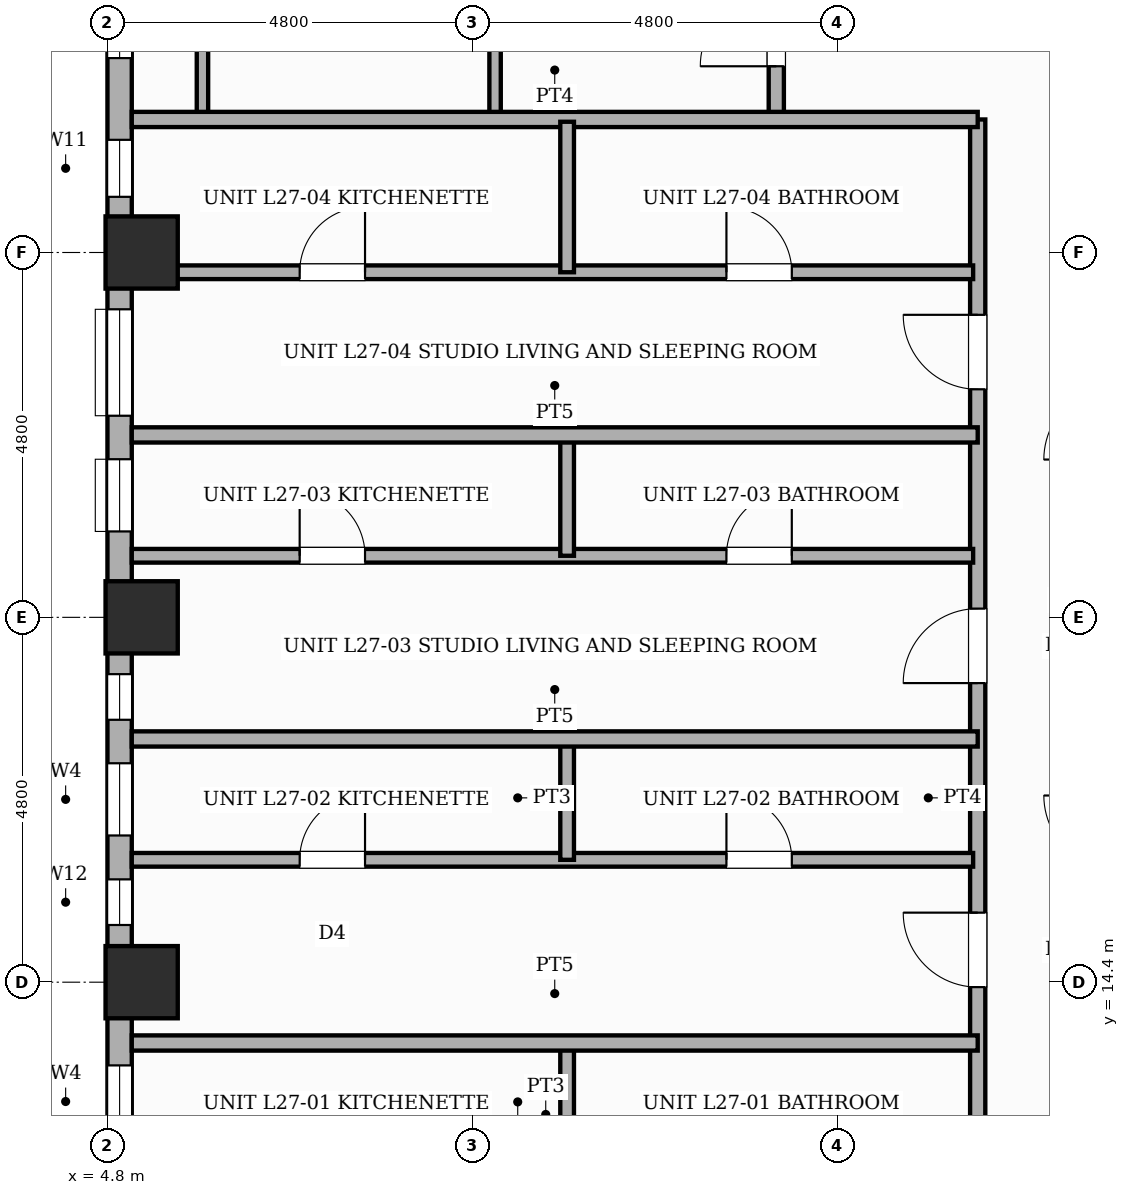
"""IFC4 building model, lengths in metres.
Left out: names, types, materials, properties, quantities, classifications, styles, units other than length and angle.
Written with IfcOpenShell. Run it as: python <this file> out.ifc"""

import sys

from ifc_helpers import new_model, si_unit, direction, frame, frame_2d, origin, origin_2d, place, context, subcontext, project, spatial, rectangle, extrude, element, fill, save


model = new_model("IFC4")
c1 = context("Model", 3, precision=1e-05, world=origin(), true_north=direction((0.0, 1.0)))
c2 = subcontext(c1, "Body", "Model", "MODEL_VIEW")
j1 = project(units=[si_unit("LENGTHUNIT", "METRE"), si_unit("PLANEANGLEUNIT", "RADIAN")], contexts=[c1])
p1 = place(None, origin())
s1 = spatial("IfcSite", under=j1, at=p1, CompositionType="ELEMENT")
p2 = place(p1, origin())
s2 = spatial("IfcBuilding", under=s1, at=p2, CompositionType="ELEMENT")
p3 = place(p2, frame((0.0, 0.0, 107.2)))
s3 = spatial("IfcBuildingStorey", under=s2, at=p3, CompositionType="ELEMENT", Elevation=107.2)
for number, where, z_axis, x_axis in (
    (1, (5.25, 14.4, 0.0), (0.0, 0.0, 1.0), (1.0, 0.0, 0.0)),
    (2, (5.25, 19.2, 0.0), (0.0, 0.0, 1.0), (1.0, 0.0, 0.0)),
    (3, (5.25, 24.0, 0.0), (0.0, 0.0, 1.0), (1.0, 0.0, 0.0)),
):
    element("IfcColumn", number, at=place(p3, frame(where, z_axis=z_axis, x_axis=x_axis)), inside=s3, PredefinedType="COLUMN", context=c2, shape_type="SweptSolid", body=[
        extrude(rectangle(XDim=0.95, YDim=0.95, at=origin_2d()), origin(), (0.0, 0.0, 1.0), 3.6),
    ])
p4 = place(p3, frame((4.96, 12.0, 0.0), z_axis=(0.0, 0.0, 1.0), x_axis=(0.0, 1.0, 0.0)))
e4 = element("IfcWall", 4, at=p4, inside=s3, PredefinedType="STANDARD", context=c2, shape_type="SweptSolid", body=[
    extrude(rectangle(XDim=33.6, YDim=0.32, at=frame_2d((16.8, 0.0))), origin(), (0.0, 0.0, 1.0), 2.54),
])
p5 = place(p4, frame((3.153, 0.0, 0.45)))
e5 = element("IfcOpeningElement", 5, at=p5, cuts=e4, PredefinedType="OPENING", context=c2, shape_type="SweptSolid", body=[
    extrude(rectangle(XDim=0.6, YDim=1.8, at=frame_2d((0.3, 0.9))), frame((0.0, 0.17, 0.0), z_axis=(0.0, -1.0, 0.0), x_axis=(1.0, 0.0, 0.0)), (0.0, 0.0, 1.0), 0.34),
])
p6 = place(p4, frame((5.853, 0.0, 0.45)))
e6 = element("IfcOpeningElement", 6, at=p6, cuts=e4, PredefinedType="OPENING", context=c2, shape_type="SweptSolid", body=[
    extrude(rectangle(XDim=0.6, YDim=1.8, at=frame_2d((0.3, 0.9))), frame((0.0, 0.17, 0.0), z_axis=(0.0, -1.0, 0.0), x_axis=(1.0, 0.0, 0.0)), (0.0, 0.0, 1.0), 0.34),
])
p7 = place(p4, frame((9.853, 0.0, 0.65)))
e7 = element("IfcOpeningElement", 7, at=p7, cuts=e4, PredefinedType="OPENING", context=c2, shape_type="SweptSolid", body=[
    extrude(rectangle(XDim=1.4, YDim=1.1, at=frame_2d((0.7, 0.55))), frame((0.0, 0.17, 0.0), z_axis=(0.0, -1.0, 0.0), x_axis=(1.0, 0.0, 0.0)), (0.0, 0.0, 1.0), 0.34),
])
p8 = place(p4, frame((0.355, 0.0, 0.45)))
e8 = element("IfcOpeningElement", 8, at=p8, cuts=e4, PredefinedType="OPENING", context=c2, shape_type="SweptSolid", body=[
    extrude(rectangle(XDim=0.95, YDim=1.8, at=frame_2d((0.475, 0.9))), frame((0.0, 0.17, 0.0), z_axis=(0.0, -1.0, 0.0), x_axis=(1.0, 0.0, 0.0)), (0.0, 0.0, 1.0), 0.34),
])
p9 = place(p4, frame((4.33, 0.0, 0.45)))
e9 = element("IfcOpeningElement", 9, at=p9, cuts=e4, PredefinedType="OPENING", context=c2, shape_type="SweptSolid", body=[
    extrude(rectangle(XDim=0.95, YDim=1.8, at=frame_2d((0.475, 0.9))), frame((0.0, 0.17, 0.0), z_axis=(0.0, -1.0, 0.0), x_axis=(1.0, 0.0, 0.0)), (0.0, 0.0, 1.0), 0.34),
])
p10 = place(p4, frame((8.33, 0.0, 0.45)))
e10 = element("IfcOpeningElement", 10, at=p10, cuts=e4, PredefinedType="OPENING", context=c2, shape_type="SweptSolid", body=[
    extrude(rectangle(XDim=0.95, YDim=1.8, at=frame_2d((0.475, 0.9))), frame((0.0, 0.17, 0.0), z_axis=(0.0, -1.0, 0.0), x_axis=(1.0, 0.0, 0.0)), (0.0, 0.0, 1.0), 0.34),
])
p11 = place(p4, frame((12.732, 0.0, 0.45)))
e11 = element("IfcOpeningElement", 11, at=p11, cuts=e4, PredefinedType="OPENING", context=c2, shape_type="SweptSolid", body=[
    extrude(rectangle(XDim=0.75, YDim=1.8, at=frame_2d((0.375, 0.9))), frame((0.0, 0.17, 0.0), z_axis=(0.0, -1.0, 0.0), x_axis=(1.0, 0.0, 0.0)), (0.0, 0.0, 1.0), 0.34),
])
p12 = place(p4, frame((14.558, 0.0, 0.65)))
e12 = element("IfcOpeningElement", 12, at=p12, cuts=e4, PredefinedType="OPENING", context=c2, shape_type="SweptSolid", body=[
    extrude(rectangle(XDim=1.4, YDim=1.1, at=frame_2d((0.7, 0.55))), frame((0.0, 0.17, 0.0), z_axis=(0.0, -1.0, 0.0), x_axis=(1.0, 0.0, 0.0)), (0.0, 0.0, 1.0), 0.34),
])
p13 = place(p3, frame((13.6, 25.75, 0.0), z_axis=(0.0, 0.0, 1.0), x_axis=(0.0, 1.0, 0.0)))
e13 = element("IfcWall", 13, at=p13, inside=s3, PredefinedType="POLYGONAL", context=c2, shape_type="SweptSolid", body=[
    extrude(rectangle(XDim=5.15, YDim=0.2, at=frame_2d((2.575, 0.0))), origin(), (0.0, 0.0, 1.0), 3.36),
])
p14 = place(p13, frame((0.7, 0.0, 0.0)))
e14 = element("IfcOpeningElement", 14, at=p14, cuts=e13, PredefinedType="OPENING", context=c2, shape_type="SweptSolid", body=[
    extrude(rectangle(XDim=1.0, YDim=2.15, at=frame_2d((0.5, 1.075))), frame((0.0, 0.11, 0.0), z_axis=(0.0, -1.0, 0.0), x_axis=(1.0, 0.0, 0.0)), (0.0, 0.0, 1.0), 0.22),
])
p15 = place(p3, frame((6.05, 25.75, 0.0), z_axis=(0.0, 0.0, 1.0), x_axis=(0.0, 1.0, 0.0)))
e15 = element("IfcWall", 15, at=p15, inside=s3, PredefinedType="PARTITIONING", context=c2, shape_type="SweptSolid", body=[
    extrude(rectangle(XDim=5.15, YDim=0.15, at=frame_2d((2.575, 0.0))), origin(), (0.0, 0.0, 1.0), 3.36),
])
p16 = place(p3, frame((9.9, 25.75, 0.0), z_axis=(0.0, 0.0, 1.0), x_axis=(0.0, 1.0, 0.0)))
e16 = element("IfcWall", 16, at=p16, inside=s3, PredefinedType="PARTITIONING", context=c2, shape_type="SweptSolid", body=[
    extrude(rectangle(XDim=5.15, YDim=0.15, at=frame_2d((2.575, 0.0))), origin(), (0.0, 0.0, 1.0), 3.36),
])
p17 = place(p16, frame((1.2, 0.0, 0.0)))
e17 = element("IfcOpeningElement", 17, at=p17, cuts=e16, PredefinedType="OPENING", context=c2, shape_type="SweptSolid", body=[
    extrude(rectangle(XDim=0.95, YDim=2.15, at=frame_2d((0.475, 1.075))), frame((0.0, 0.085, 0.0), z_axis=(0.0, -1.0, 0.0), x_axis=(1.0, 0.0, 0.0)), (0.0, 0.0, 1.0), 0.17),
])
p18 = place(p3, frame((16.25, 9.92, 0.0), z_axis=(0.0, 0.0, 1.0), x_axis=(0.0, 1.0, 0.0)))
e18 = element("IfcWall", 18, at=p18, inside=s3, PredefinedType="PARTITIONING", context=c2, shape_type="SweptSolid", body=[
    extrude(rectangle(XDim=15.83, YDim=0.2, at=frame_2d((7.915, 0.0))), origin(), (0.0, 0.0, 1.0), 3.36),
])
p19 = place(p18, frame((0.835, 0.0, 0.0)))
e19 = element("IfcOpeningElement", 19, at=p19, cuts=e18, PredefinedType="OPENING", context=c2, shape_type="SweptSolid", body=[
    extrude(rectangle(XDim=0.98, YDim=2.18, at=frame_2d((0.49, 1.09))), frame((0.0, 0.11, 0.0), z_axis=(0.0, -1.0, 0.0), x_axis=(1.0, 0.0, 0.0)), (0.0, 0.0, 1.0), 0.22),
])
p20 = place(p18, frame((4.415, 0.0, 0.0)))
e20 = element("IfcOpeningElement", 20, at=p20, cuts=e18, PredefinedType="OPENING", context=c2, shape_type="SweptSolid", body=[
    extrude(rectangle(XDim=0.98, YDim=2.18, at=frame_2d((0.49, 1.09))), frame((0.0, 0.11, 0.0), z_axis=(0.0, -1.0, 0.0), x_axis=(1.0, 0.0, 0.0)), (0.0, 0.0, 1.0), 0.22),
])
p21 = place(p18, frame((8.415, 0.0, 0.0)))
e21 = element("IfcOpeningElement", 21, at=p21, cuts=e18, PredefinedType="OPENING", context=c2, shape_type="SweptSolid", body=[
    extrude(rectangle(XDim=0.98, YDim=2.18, at=frame_2d((0.49, 1.09))), frame((0.0, 0.11, 0.0), z_axis=(0.0, -1.0, 0.0), x_axis=(1.0, 0.0, 0.0)), (0.0, 0.0, 1.0), 0.22),
])
p22 = place(p18, frame((12.28, 0.0, 0.0)))
e22 = element("IfcOpeningElement", 22, at=p22, cuts=e18, PredefinedType="OPENING", context=c2, shape_type="SweptSolid", body=[
    extrude(rectangle(XDim=0.98, YDim=2.18, at=frame_2d((0.49, 1.09))), frame((0.0, 0.11, 0.0), z_axis=(0.0, -1.0, 0.0), x_axis=(1.0, 0.0, 0.0)), (0.0, 0.0, 1.0), 0.22),
])
p23 = place(p3, frame((5.12, 25.75, 0.0), z_axis=(0.0, 0.0, 1.0), x_axis=(1.0, 0.0, 0.0)))
e23 = element("IfcWall", 23, at=p23, inside=s3, PredefinedType="PARTITIONING", context=c2, shape_type="SweptSolid", body=[
    extrude(rectangle(XDim=11.13, YDim=0.2, at=frame_2d((5.565, 0.0))), origin(), (0.0, 0.0, 1.0), 3.36),
])
p24 = place(p3, frame((10.848, 12.01, 0.0), z_axis=(0.0, 0.0, 1.0), x_axis=(0.0, 1.0, 0.0)))
e24 = element("IfcWall", 24, at=p24, inside=s3, PredefinedType="PLUMBINGWALL", context=c2, shape_type="SweptSolid", body=[
    extrude(rectangle(XDim=1.63, YDim=0.18, at=frame_2d((0.815, 0.0))), origin(), (0.0, 0.0, 1.0), 3.36),
])
p25 = place(p3, frame((5.12, 13.6, 0.0), z_axis=(0.0, 0.0, 1.0), x_axis=(1.0, 0.0, 0.0)))
e25 = element("IfcWall", 25, at=p25, inside=s3, PredefinedType="SOLIDWALL", context=c2, shape_type="SweptSolid", body=[
    extrude(rectangle(XDim=11.13, YDim=0.2, at=frame_2d((5.565, 0.0))), origin(), (0.0, 0.0, 1.0), 3.36),
])
p26 = place(p3, frame((5.12, 16.01, 0.0), z_axis=(0.0, 0.0, 1.0), x_axis=(1.0, 0.0, 0.0)))
e26 = element("IfcWall", 26, at=p26, inside=s3, PredefinedType="PLUMBINGWALL", context=c2, shape_type="SweptSolid", body=[
    extrude(rectangle(XDim=11.07, YDim=0.18, at=frame_2d((5.535, 0.0))), origin(), (0.0, 0.0, 1.0), 3.36),
])
p27 = place(p26, frame((2.209, 0.0, 0.0)))
e27 = element("IfcOpeningElement", 27, at=p27, cuts=e26, PredefinedType="OPENING", context=c2, shape_type="SweptSolid", body=[
    extrude(rectangle(XDim=0.86, YDim=2.1, at=frame_2d((0.43, 1.05))), frame((0.0, 0.1, 0.0), z_axis=(0.0, -1.0, 0.0), x_axis=(1.0, 0.0, 0.0)), (0.0, 0.0, 1.0), 0.2),
])
p28 = place(p26, frame((7.824, 0.0, 0.0)))
e28 = element("IfcOpeningElement", 28, at=p28, cuts=e26, PredefinedType="OPENING", context=c2, shape_type="SweptSolid", body=[
    extrude(rectangle(XDim=0.86, YDim=2.1, at=frame_2d((0.43, 1.05))), frame((0.0, 0.1, 0.0), z_axis=(0.0, -1.0, 0.0), x_axis=(1.0, 0.0, 0.0)), (0.0, 0.0, 1.0), 0.2),
])
p29 = place(p3, frame((10.848, 16.01, 0.0), z_axis=(0.0, 0.0, 1.0), x_axis=(0.0, 1.0, 0.0)))
e29 = element("IfcWall", 29, at=p29, inside=s3, PredefinedType="PLUMBINGWALL", context=c2, shape_type="SweptSolid", body=[
    extrude(rectangle(XDim=1.63, YDim=0.18, at=frame_2d((0.815, 0.0))), origin(), (0.0, 0.0, 1.0), 3.36),
])
p30 = place(p3, frame((5.12, 17.6, 0.0), z_axis=(0.0, 0.0, 1.0), x_axis=(1.0, 0.0, 0.0)))
e30 = element("IfcWall", 30, at=p30, inside=s3, PredefinedType="SOLIDWALL", context=c2, shape_type="SweptSolid", body=[
    extrude(rectangle(XDim=11.13, YDim=0.2, at=frame_2d((5.565, 0.0))), origin(), (0.0, 0.0, 1.0), 3.36),
])
p31 = place(p3, frame((5.12, 20.01, 0.0), z_axis=(0.0, 0.0, 1.0), x_axis=(1.0, 0.0, 0.0)))
e31 = element("IfcWall", 31, at=p31, inside=s3, PredefinedType="PLUMBINGWALL", context=c2, shape_type="SweptSolid", body=[
    extrude(rectangle(XDim=11.07, YDim=0.18, at=frame_2d((5.535, 0.0))), origin(), (0.0, 0.0, 1.0), 3.36),
])
p32 = place(p31, frame((2.209, 0.0, 0.0)))
e32 = element("IfcOpeningElement", 32, at=p32, cuts=e31, PredefinedType="OPENING", context=c2, shape_type="SweptSolid", body=[
    extrude(rectangle(XDim=0.86, YDim=2.1, at=frame_2d((0.43, 1.05))), frame((0.0, 0.1, 0.0), z_axis=(0.0, -1.0, 0.0), x_axis=(1.0, 0.0, 0.0)), (0.0, 0.0, 1.0), 0.2),
])
p33 = place(p31, frame((7.824, 0.0, 0.0)))
e33 = element("IfcOpeningElement", 33, at=p33, cuts=e31, PredefinedType="OPENING", context=c2, shape_type="SweptSolid", body=[
    extrude(rectangle(XDim=0.86, YDim=2.1, at=frame_2d((0.43, 1.05))), frame((0.0, 0.1, 0.0), z_axis=(0.0, -1.0, 0.0), x_axis=(1.0, 0.0, 0.0)), (0.0, 0.0, 1.0), 0.2),
])
p34 = place(p3, frame((10.848, 20.01, 0.0), z_axis=(0.0, 0.0, 1.0), x_axis=(0.0, 1.0, 0.0)))
e34 = element("IfcWall", 34, at=p34, inside=s3, PredefinedType="PLUMBINGWALL", context=c2, shape_type="SweptSolid", body=[
    extrude(rectangle(XDim=1.63, YDim=0.18, at=frame_2d((0.815, 0.0))), origin(), (0.0, 0.0, 1.0), 3.36),
])
p35 = place(p3, frame((5.12, 21.6, 0.0), z_axis=(0.0, 0.0, 1.0), x_axis=(1.0, 0.0, 0.0)))
e35 = element("IfcWall", 35, at=p35, inside=s3, PredefinedType="SOLIDWALL", context=c2, shape_type="SweptSolid", body=[
    extrude(rectangle(XDim=11.13, YDim=0.2, at=frame_2d((5.565, 0.0))), origin(), (0.0, 0.0, 1.0), 3.36),
])
p36 = place(p3, frame((5.12, 23.74, 0.0), z_axis=(0.0, 0.0, 1.0), x_axis=(1.0, 0.0, 0.0)))
e36 = element("IfcWall", 36, at=p36, inside=s3, PredefinedType="PLUMBINGWALL", context=c2, shape_type="SweptSolid", body=[
    extrude(rectangle(XDim=11.07, YDim=0.18, at=frame_2d((5.535, 0.0))), origin(), (0.0, 0.0, 1.0), 2.54),
])
p37 = place(p36, frame((2.209, 0.0, 0.0)))
e37 = element("IfcOpeningElement", 37, at=p37, cuts=e36, PredefinedType="OPENING", context=c2, shape_type="SweptSolid", body=[
    extrude(rectangle(XDim=0.86, YDim=2.1, at=frame_2d((0.43, 1.05))), frame((0.0, 0.1, 0.0), z_axis=(0.0, -1.0, 0.0), x_axis=(1.0, 0.0, 0.0)), (0.0, 0.0, 1.0), 0.2),
])
p38 = place(p36, frame((7.824, 0.0, 0.0)))
e38 = element("IfcOpeningElement", 38, at=p38, cuts=e36, PredefinedType="OPENING", context=c2, shape_type="SweptSolid", body=[
    extrude(rectangle(XDim=0.86, YDim=2.1, at=frame_2d((0.43, 1.05))), frame((0.0, 0.1, 0.0), z_axis=(0.0, -1.0, 0.0), x_axis=(1.0, 0.0, 0.0)), (0.0, 0.0, 1.0), 0.2),
])
p39 = place(p3, frame((10.848, 23.74, 0.0), z_axis=(0.0, 0.0, 1.0), x_axis=(0.0, 1.0, 0.0)))
e39 = element("IfcWall", 39, at=p39, inside=s3, PredefinedType="PLUMBINGWALL", context=c2, shape_type="SweptSolid", body=[
    extrude(rectangle(XDim=1.98, YDim=0.18, at=frame_2d((0.99, 0.0))), origin(), (0.0, 0.0, 1.0), 3.36),
])
p40 = place(p5, origin())
e40 = element("IfcWindow", 40, at=p40, inside=s3, PartitioningType="SINGLE_PANEL", PredefinedType="WINDOW", context=c2, shape_type="SweptSolid", body=[
    extrude(rectangle(XDim=0.6, YDim=1.8, at=frame_2d((0.3, 0.9))), frame((0.0, 0.03, 0.0), z_axis=(0.0, -1.0, 0.0), x_axis=(1.0, 0.0, 0.0)), (0.0, 0.0, 1.0), 0.06),
])
fill(e5, e40)
p41 = place(p6, origin())
e41 = element("IfcWindow", 41, at=p41, inside=s3, PartitioningType="SINGLE_PANEL", PredefinedType="WINDOW", context=c2, shape_type="SweptSolid", body=[
    extrude(rectangle(XDim=0.6, YDim=1.8, at=frame_2d((0.3, 0.9))), frame((0.0, 0.03, 0.0), z_axis=(0.0, -1.0, 0.0), x_axis=(1.0, 0.0, 0.0)), (0.0, 0.0, 1.0), 0.06),
])
fill(e6, e41)
p42 = place(p7, origin())
e42 = element("IfcWindow", 42, at=p42, inside=s3, PartitioningType="SINGLE_PANEL", PredefinedType="WINDOW", context=c2, shape_type="SweptSolid", body=[
    extrude(rectangle(XDim=1.4, YDim=1.1, at=frame_2d((0.7, 0.55))), frame((0.0, 0.03, 0.0), z_axis=(0.0, -1.0, 0.0), x_axis=(1.0, 0.0, 0.0)), (0.0, 0.0, 1.0), 0.06),
])
fill(e7, e42)
p43 = place(p8, origin())
e43 = element("IfcWindow", 43, at=p43, inside=s3, PartitioningType="SINGLE_PANEL", PredefinedType="WINDOW", context=c2, shape_type="SweptSolid", body=[
    extrude(rectangle(XDim=0.95, YDim=1.8, at=frame_2d((0.475, 0.9))), frame((0.0, 0.03, 0.0), z_axis=(0.0, -1.0, 0.0), x_axis=(1.0, 0.0, 0.0)), (0.0, 0.0, 1.0), 0.06),
])
fill(e8, e43)
p44 = place(p9, origin())
e44 = element("IfcWindow", 44, at=p44, inside=s3, PartitioningType="SINGLE_PANEL", PredefinedType="WINDOW", context=c2, shape_type="SweptSolid", body=[
    extrude(rectangle(XDim=0.95, YDim=1.8, at=frame_2d((0.475, 0.9))), frame((0.0, 0.03, 0.0), z_axis=(0.0, -1.0, 0.0), x_axis=(1.0, 0.0, 0.0)), (0.0, 0.0, 1.0), 0.06),
])
fill(e9, e44)
p45 = place(p10, origin())
e45 = element("IfcWindow", 45, at=p45, inside=s3, PartitioningType="SINGLE_PANEL", PredefinedType="WINDOW", context=c2, shape_type="SweptSolid", body=[
    extrude(rectangle(XDim=0.95, YDim=1.8, at=frame_2d((0.475, 0.9))), frame((0.0, 0.03, 0.0), z_axis=(0.0, -1.0, 0.0), x_axis=(1.0, 0.0, 0.0)), (0.0, 0.0, 1.0), 0.06),
])
fill(e10, e45)
p46 = place(p11, origin())
e46 = element("IfcWindow", 46, at=p46, inside=s3, PartitioningType="SINGLE_PANEL", PredefinedType="WINDOW", context=c2, shape_type="SweptSolid", body=[
    extrude(rectangle(XDim=0.75, YDim=1.8, at=frame_2d((0.375, 0.9))), frame((0.0, 0.03, 0.0), z_axis=(0.0, -1.0, 0.0), x_axis=(1.0, 0.0, 0.0)), (0.0, 0.0, 1.0), 0.06),
])
fill(e11, e46)
p47 = place(p12, origin())
e47 = element("IfcWindow", 47, at=p47, inside=s3, PartitioningType="SINGLE_PANEL", PredefinedType="WINDOW", context=c2, shape_type="SweptSolid", body=[
    extrude(rectangle(XDim=1.4, YDim=1.1, at=frame_2d((0.7, 0.55))), frame((0.0, 0.03, 0.0), z_axis=(0.0, -1.0, 0.0), x_axis=(1.0, 0.0, 0.0)), (0.0, 0.0, 1.0), 0.06),
])
fill(e12, e47)
p48 = place(p14, origin())
e48 = element("IfcDoor", 48, at=p48, inside=s3, OperationType="SINGLE_SWING_LEFT", PredefinedType="DOOR", context=c2, shape_type="SweptSolid", body=[
    extrude(rectangle(XDim=1.0, YDim=2.15, at=frame_2d((0.5, 1.075))), frame((0.0, 0.025, 0.0), z_axis=(0.0, -1.0, 0.0), x_axis=(1.0, 0.0, 0.0)), (0.0, 0.0, 1.0), 0.05),
])
fill(e14, e48)
p49 = place(p20, origin())
e49 = element("IfcDoor", 49, at=p49, inside=s3, OperationType="SINGLE_SWING_RIGHT", PredefinedType="DOOR", context=c2, shape_type="SweptSolid", body=[
    extrude(rectangle(XDim=0.98, YDim=2.18, at=frame_2d((0.49, 1.09))), frame((0.0, 0.025, 0.0), z_axis=(0.0, -1.0, 0.0), x_axis=(1.0, 0.0, 0.0)), (0.0, 0.0, 1.0), 0.05),
])
fill(e20, e49)
p50 = place(p27, origin())
e50 = element("IfcDoor", 50, at=p50, inside=s3, OperationType="SINGLE_SWING_RIGHT", PredefinedType="DOOR", context=c2, shape_type="SweptSolid", body=[
    extrude(rectangle(XDim=0.86, YDim=2.1, at=frame_2d((0.43, 1.05))), frame((0.0, 0.025, 0.0), z_axis=(0.0, -1.0, 0.0), x_axis=(1.0, 0.0, 0.0)), (0.0, 0.0, 1.0), 0.05),
])
fill(e27, e50)
p51 = place(p28, origin())
e51 = element("IfcDoor", 51, at=p51, inside=s3, OperationType="SINGLE_SWING_LEFT", PredefinedType="DOOR", context=c2, shape_type="SweptSolid", body=[
    extrude(rectangle(XDim=0.86, YDim=2.1, at=frame_2d((0.43, 1.05))), frame((0.0, 0.025, 0.0), z_axis=(0.0, -1.0, 0.0), x_axis=(1.0, 0.0, 0.0)), (0.0, 0.0, 1.0), 0.05),
])
fill(e28, e51)
p52 = place(p21, origin())
e52 = element("IfcDoor", 52, at=p52, inside=s3, OperationType="SINGLE_SWING_LEFT", PredefinedType="DOOR", context=c2, shape_type="SweptSolid", body=[
    extrude(rectangle(XDim=0.98, YDim=2.18, at=frame_2d((0.49, 1.09))), frame((0.0, 0.025, 0.0), z_axis=(0.0, -1.0, 0.0), x_axis=(1.0, 0.0, 0.0)), (0.0, 0.0, 1.0), 0.05),
])
fill(e21, e52)
p53 = place(p32, origin())
e53 = element("IfcDoor", 53, at=p53, inside=s3, OperationType="SINGLE_SWING_LEFT", PredefinedType="DOOR", context=c2, shape_type="SweptSolid", body=[
    extrude(rectangle(XDim=0.86, YDim=2.1, at=frame_2d((0.43, 1.05))), frame((0.0, 0.025, 0.0), z_axis=(0.0, -1.0, 0.0), x_axis=(1.0, 0.0, 0.0)), (0.0, 0.0, 1.0), 0.05),
])
fill(e32, e53)
p54 = place(p33, origin())
e54 = element("IfcDoor", 54, at=p54, inside=s3, OperationType="SINGLE_SWING_RIGHT", PredefinedType="DOOR", context=c2, shape_type="SweptSolid", body=[
    extrude(rectangle(XDim=0.86, YDim=2.1, at=frame_2d((0.43, 1.05))), frame((0.0, 0.025, 0.0), z_axis=(0.0, -1.0, 0.0), x_axis=(1.0, 0.0, 0.0)), (0.0, 0.0, 1.0), 0.05),
])
fill(e33, e54)
p55 = place(p22, origin())
e55 = element("IfcDoor", 55, at=p55, inside=s3, OperationType="SINGLE_SWING_RIGHT", PredefinedType="DOOR", context=c2, shape_type="SweptSolid", body=[
    extrude(rectangle(XDim=0.98, YDim=2.18, at=frame_2d((0.49, 1.09))), frame((0.0, 0.025, 0.0), z_axis=(0.0, -1.0, 0.0), x_axis=(1.0, 0.0, 0.0)), (0.0, 0.0, 1.0), 0.05),
])
fill(e22, e55)
p56 = place(p37, origin())
e56 = element("IfcDoor", 56, at=p56, inside=s3, OperationType="SINGLE_SWING_RIGHT", PredefinedType="DOOR", context=c2, shape_type="SweptSolid", body=[
    extrude(rectangle(XDim=0.86, YDim=2.1, at=frame_2d((0.43, 1.05))), frame((0.0, 0.025, 0.0), z_axis=(0.0, -1.0, 0.0), x_axis=(1.0, 0.0, 0.0)), (0.0, 0.0, 1.0), 0.05),
])
fill(e37, e56)
p57 = place(p38, origin())
e57 = element("IfcDoor", 57, at=p57, inside=s3, OperationType="SINGLE_SWING_LEFT", PredefinedType="DOOR", context=c2, shape_type="SweptSolid", body=[
    extrude(rectangle(XDim=0.86, YDim=2.1, at=frame_2d((0.43, 1.05))), frame((0.0, 0.025, 0.0), z_axis=(0.0, -1.0, 0.0), x_axis=(1.0, 0.0, 0.0)), (0.0, 0.0, 1.0), 0.05),
])
fill(e38, e57)
save(model, sys.argv[1])
